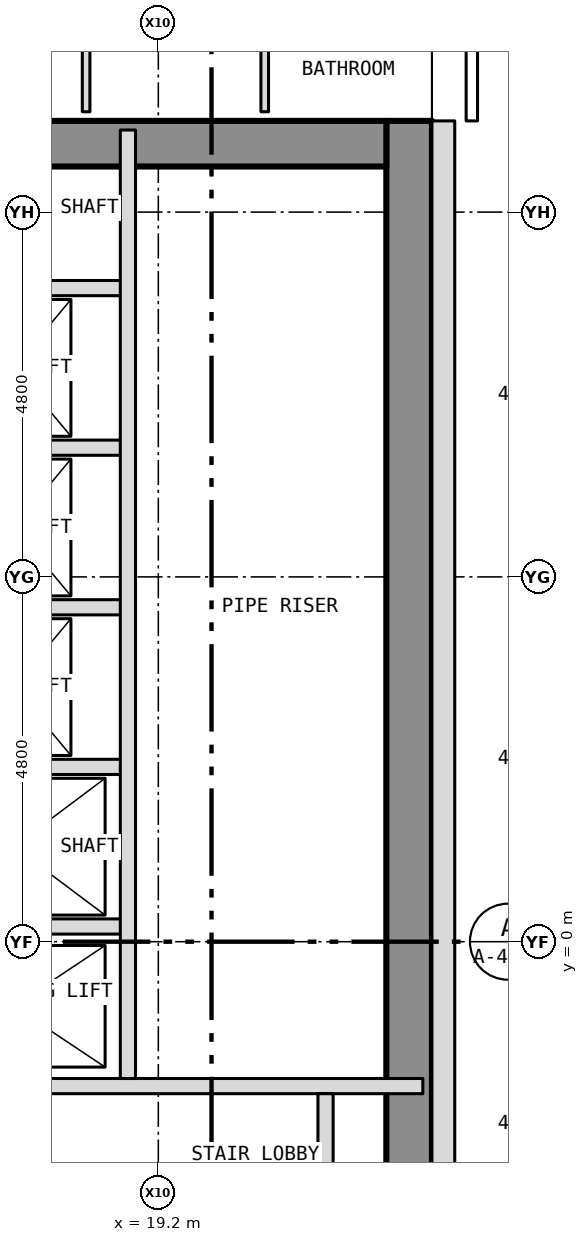
"""IFC4 building model, lengths in metres.
Left out: names, types, materials, properties, quantities, classifications, styles, units other than length and angle.
Written with IfcOpenShell. Run it as: python <this file> out.ifc"""

import sys

from ifc_helpers import new_model, si_unit, direction, frame, frame_2d, origin, place, context, subcontext, project, spatial, rectangle, extrude, element, save


model = new_model("IFC4")
c1 = context("Model", 3, precision=1e-05, world=origin(), true_north=direction((0.0, 1.0)))
c2 = subcontext(c1, "Body", "Model", "MODEL_VIEW")
j1 = project(units=[si_unit("LENGTHUNIT", "METRE"), si_unit("PLANEANGLEUNIT", "RADIAN")], contexts=[c1])
p1 = place(None, origin())
s1 = spatial("IfcSite", under=j1, at=p1, CompositionType="ELEMENT")
p2 = place(p1, origin())
s2 = spatial("IfcBuilding", under=s1, at=p2, CompositionType="ELEMENT")
p3 = place(p2, frame((0.0, 0.0, 127.5)))
s3 = spatial("IfcBuildingStorey", under=s2, at=p3, CompositionType="ELEMENT", Elevation=127.5)
p4 = place(p3, frame((22.5, -10.8, 0.0), z_axis=(0.0, 0.0, 1.0), x_axis=(0.0, 1.0, 0.0)))
e1 = element("IfcWall", 1, at=p4, inside=s3, PredefinedType="SHEAR", context=c2, shape_type="SweptSolid", body=[
    extrude(rectangle(XDim=21.6, YDim=0.6, at=frame_2d((10.8, 0.0))), origin(), (0.0, 0.0, 1.0), 3.25),
])
p5 = place(p3, frame((16.4, 10.5, 0.0), z_axis=(0.0, 0.0, 1.0), x_axis=(1.0, 0.0, 0.0)))
e2 = element("IfcWall", 2, at=p5, inside=s3, PredefinedType="SHEAR", context=c2, shape_type="SweptSolid", body=[
    extrude(rectangle(XDim=5.8, YDim=0.6, at=frame_2d((2.9, 0.0))), origin(), (0.0, 0.0, 1.0), 3.25),
])
p6 = place(p3, frame((22.95, -10.8, 0.0), z_axis=(0.0, 0.0, 1.0), x_axis=(0.0, 1.0, 0.0)))
e3 = element("IfcWall", 3, at=p6, inside=s3, PredefinedType="SOLIDWALL", context=c2, shape_type="SweptSolid", body=[
    extrude(rectangle(XDim=21.6, YDim=0.3, at=frame_2d((10.8, 0.0))), origin(), (0.0, 0.0, 1.0), 3.5),
])
p7 = place(p6, frame((2.95, 0.0, 1.0)))
e4 = element("IfcOpeningElement", 4, at=p7, cuts=e3, PredefinedType="OPENING", context=c2, shape_type="SweptSolid", body=[
    extrude(rectangle(XDim=0.6, YDim=1.5, at=frame_2d((0.3, 0.75))), frame((0.0, 0.162, 0.0), z_axis=(0.0, -1.0, 0.0), x_axis=(1.0, 0.0, 0.0)), (0.0, 0.0, 1.0), 0.324),
])
p8 = place(p3, frame((15.92, -1.9, 0.0), z_axis=(0.0, 0.0, 1.0), x_axis=(1.0, 0.0, 0.0)))
e5 = element("IfcWall", 5, at=p8, inside=s3, PredefinedType="PARTITIONING", context=c2, shape_type="SweptSolid", body=[
    extrude(rectangle(XDim=6.76, YDim=0.2, at=frame_2d((3.38, 0.0))), origin(), (0.0, 0.0, 1.0), 3.25),
])
for number, where, z_axis, x_axis in (
    (6, (15.92, 0.2, 0.0), (0.0, 0.0, 1.0), (1.0, 0.0, 0.0)),
    (7, (15.92, 2.3, 0.0), (0.0, 0.0, 1.0), (1.0, 0.0, 0.0)),
    (8, (15.92, 4.4, 0.0), (0.0, 0.0, 1.0), (1.0, 0.0, 0.0)),
    (9, (15.92, 6.5, 0.0), (0.0, 0.0, 1.0), (1.0, 0.0, 0.0)),
    (10, (15.92, 8.6, 0.0), (0.0, 0.0, 1.0), (1.0, 0.0, 0.0)),
):
    element("IfcWall", number, at=place(p3, frame(where, z_axis=z_axis, x_axis=x_axis)), inside=s3, PredefinedType="PARTITIONING", context=c2, shape_type="SweptSolid", body=[
        extrude(rectangle(XDim=2.88, YDim=0.2, at=frame_2d((1.44, 0.0))), origin(), (0.0, 0.0, 1.0), 3.25),
    ])
p9 = place(p3, frame((18.25, 10.92, 0.0), z_axis=(0.0, 0.0, 1.0), x_axis=(0.0, 1.0, 0.0)))
e11 = element("IfcWall", 11, at=p9, inside=s3, PredefinedType="PARTITIONING", context=c2, shape_type="SweptSolid", body=[
    extrude(rectangle(XDim=7.271, YDim=0.1, at=frame_2d((3.635, 0.0))), origin(), (0.0, 0.0, 1.0), 3.35),
])
p10 = place(p9, frame((5.43, 0.0, 0.0)))
e12 = element("IfcOpeningElement", 12, at=p10, cuts=e11, PredefinedType="OPENING", context=c2, shape_type="SweptSolid", body=[
    extrude(rectangle(XDim=0.9, YDim=2.1, at=frame_2d((0.45, 1.05))), frame((0.0, 0.062, 0.0), z_axis=(0.0, -1.0, 0.0), x_axis=(1.0, 0.0, 0.0)), (0.0, 0.0, 1.0), 0.124),
])
p11 = place(p3, frame((18.8, -1.8, 0.0), z_axis=(0.0, 0.0, 1.0), x_axis=(0.0, 1.0, 0.0)))
e13 = element("IfcWall", 13, at=p11, inside=s3, PredefinedType="PARTITIONING", context=c2, shape_type="SweptSolid", body=[
    extrude(rectangle(XDim=12.48, YDim=0.2, at=frame_2d((6.24, 0.0))), origin(), (0.0, 0.0, 1.0), 3.25),
])
p12 = place(p3, frame((20.6, 10.92, 0.0), z_axis=(0.0, 0.0, 1.0), x_axis=(0.0, 1.0, 0.0)))
e14 = element("IfcWall", 14, at=p12, inside=s3, PredefinedType="PARTITIONING", context=c2, shape_type="SweptSolid", body=[
    extrude(rectangle(XDim=3.03, YDim=0.1, at=frame_2d((1.515, 0.0))), origin(), (0.0, 0.0, 1.0), 3.35),
])
p13 = place(p12, frame((1.67, 0.0, 0.0)))
e15 = element("IfcOpeningElement", 15, at=p13, cuts=e14, PredefinedType="OPENING", context=c2, shape_type="SweptSolid", body=[
    extrude(rectangle(XDim=0.9, YDim=2.1, at=frame_2d((0.45, 1.05))), frame((0.0, 0.062, 0.0), z_axis=(0.0, -1.0, 0.0), x_axis=(1.0, 0.0, 0.0)), (0.0, 0.0, 1.0), 0.124),
])
p14 = place(p3, frame((21.4, -10.68, 0.0), z_axis=(0.0, 0.0, 1.0), x_axis=(0.0, 1.0, 0.0)))
e16 = element("IfcWall", 16, at=p14, inside=s3, PredefinedType="PARTITIONING", context=c2, shape_type="SweptSolid", body=[
    extrude(rectangle(XDim=8.68, YDim=0.2, at=frame_2d((4.34, 0.0))), origin(), (0.0, 0.0, 1.0), 3.25),
])
p15 = place(p14, frame((3.88, 0.0, 0.0)))
e17 = element("IfcOpeningElement", 17, at=p15, cuts=e16, PredefinedType="OPENING", context=c2, shape_type="SweptSolid", body=[
    extrude(rectangle(XDim=0.9, YDim=2.1, at=frame_2d((0.45, 1.05))), frame((0.0, 0.112, 0.0), z_axis=(0.0, -1.0, 0.0), x_axis=(1.0, 0.0, 0.0)), (0.0, 0.0, 1.0), 0.224),
])
save(model, sys.argv[1])
